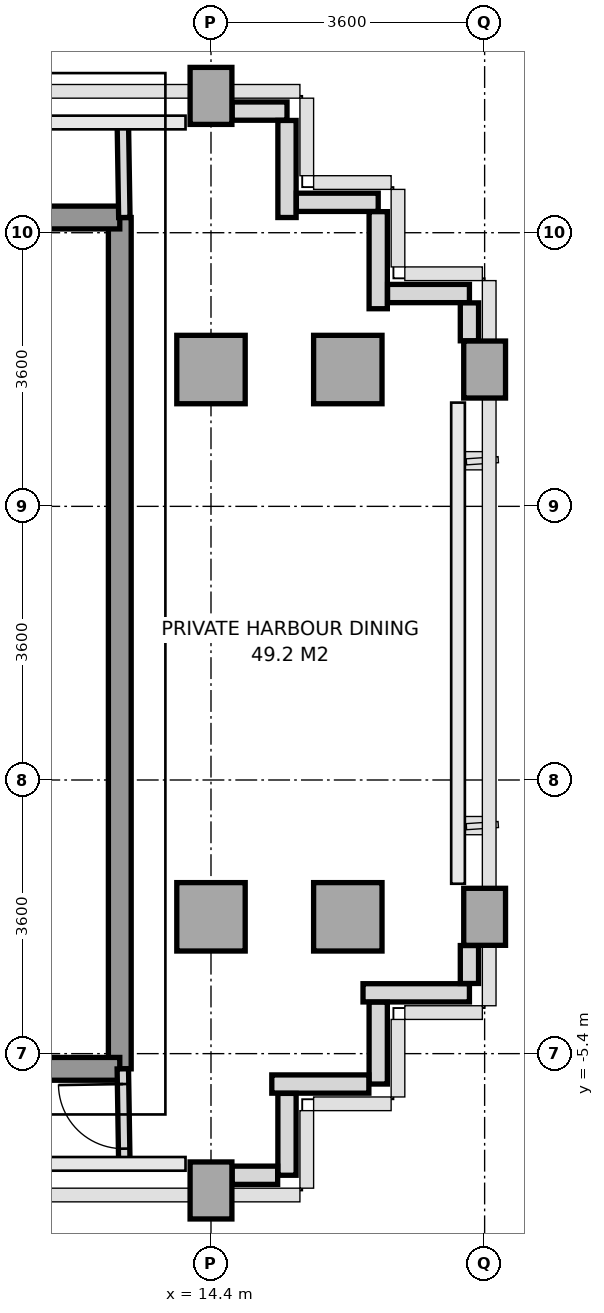
"""IFC4 building model, lengths in metres.
Left out: names, types, materials, properties, quantities, classifications, styles, units other than length and angle.
Written with IfcOpenShell. Run it as: python <this file> out.ifc"""

import sys

from ifc_helpers import new_model, si_unit, direction, frame, frame_2d, origin, origin_2d, place, context, subcontext, project, spatial, rectangle, extrude, source, transform, mapped, element, fill, save


model = new_model("IFC4")
c1 = context("Model", 3, precision=1e-05, world=origin(), true_north=direction((0.0, 1.0)))
c2 = subcontext(c1, "Body", "Model", "MODEL_VIEW")
j1 = project(units=[si_unit("LENGTHUNIT", "METRE"), si_unit("PLANEANGLEUNIT", "RADIAN")], contexts=[c1])
p1 = place(None, origin())
s1 = spatial("IfcSite", under=j1, at=p1, CompositionType="ELEMENT")
p2 = place(p1, origin())
s2 = spatial("IfcBuilding", under=s1, at=p2, CompositionType="ELEMENT")
p3 = place(p2, frame((0.0, 0.0, 246.0)))
s3 = spatial("IfcBuildingStorey", under=s2, at=p3, CompositionType="ELEMENT", Elevation=246.0)
m1 = source(origin(), c2, "Body", "SweptSolid", [
    extrude(rectangle(XDim=0.55, YDim=0.75, at=origin_2d()), origin(), (0.0, 0.0, 1.0), 3.01),
])
p4 = place(p3, frame((14.4, -7.2, 0.0), z_axis=(0.0, 0.0, 1.0), x_axis=(1.0, 0.0, 0.0)))
e1 = element("IfcColumn", 1, at=p4, inside=s3, PredefinedType="COLUMN", context=c2, shape_type="MappedRepresentation", body=[
    mapped(m1, transform((0.0, 0.0, 0.0), x_axis=(1.0, 0.0, 0.0), y_axis=(0.0, 1.0, 0.0), z_axis=(0.0, 0.0, 1.0), scale=1.0)),
])
m2 = source(origin(), c2, "Body", "SweptSolid", [
    extrude(rectangle(XDim=0.9, YDim=0.9, at=origin_2d()), origin(), (0.0, 0.0, 1.0), 3.01),
])
for number, where, z_axis, x_axis in (
    (2, (14.4, -3.6, 0.0), (0.0, 0.0, 1.0), (1.0, 0.0, 0.0)),
    (3, (14.4, 3.6, 0.0), (0.0, 0.0, 1.0), (1.0, 0.0, 0.0)),
):
    element("IfcColumn", number, at=place(p3, frame(where, z_axis=z_axis, x_axis=x_axis)), inside=s3, PredefinedType="COLUMN", context=c2, shape_type="MappedRepresentation", body=[
        mapped(m2, transform((0.0, 0.0, 0.0), x_axis=(1.0, 0.0, 0.0), y_axis=(0.0, 1.0, 0.0), z_axis=(0.0, 0.0, 1.0), scale=1.0)),
    ])
p5 = place(p3, frame((14.4, 7.2, 0.0), z_axis=(0.0, 0.0, 1.0), x_axis=(1.0, 0.0, 0.0)))
e4 = element("IfcColumn", 4, at=p5, inside=s3, PredefinedType="COLUMN", context=c2, shape_type="MappedRepresentation", body=[
    mapped(m1, transform((0.0, 0.0, 0.0), x_axis=(1.0, 0.0, 0.0), y_axis=(0.0, 1.0, 0.0), z_axis=(0.0, 0.0, 1.0), scale=1.0)),
])
for number, where, z_axis, x_axis in (
    (5, (16.2, -3.6, 0.0), (0.0, 0.0, 1.0), (1.0, 0.0, 0.0)),
    (6, (16.2, 3.6, 0.0), (0.0, 0.0, 1.0), (1.0, 0.0, 0.0)),
):
    element("IfcColumn", number, at=place(p3, frame(where, z_axis=z_axis, x_axis=x_axis)), inside=s3, PredefinedType="COLUMN", context=c2, shape_type="MappedRepresentation", body=[
        mapped(m2, transform((0.0, 0.0, 0.0), x_axis=(1.0, 0.0, 0.0), y_axis=(0.0, 1.0, 0.0), z_axis=(0.0, 0.0, 1.0), scale=1.0)),
    ])
for number, where, z_axis, x_axis in (
    (7, (18.0, -3.6, 0.0), (0.0, 0.0, 1.0), (1.0, 0.0, 0.0)),
    (8, (18.0, 3.6, 0.0), (0.0, 0.0, 1.0), (1.0, 0.0, 0.0)),
):
    element("IfcColumn", number, at=place(p3, frame(where, z_axis=z_axis, x_axis=x_axis)), inside=s3, PredefinedType="COLUMN", context=c2, shape_type="MappedRepresentation", body=[
        mapped(m1, transform((0.0, 0.0, 0.0), x_axis=(1.0, 0.0, 0.0), y_axis=(0.0, 1.0, 0.0), z_axis=(0.0, 0.0, 1.0), scale=1.0)),
    ])
p6 = place(p3, frame((17.8, -4.6, 0.0), z_axis=(0.0, 0.0, 1.0), x_axis=(-1.0, 0.0, 0.0)))
e9 = element("IfcWall", 9, at=p6, inside=s3, PredefinedType="PARAPET", context=c2, shape_type="SweptSolid", body=[
    extrude(rectangle(XDim=1.4, YDim=0.24, at=frame_2d((0.7, 0.0))), origin(), (0.0, 0.0, 1.0), 1.15),
])
p7 = place(p3, frame((16.6, -4.723, 0.0), z_axis=(0.0, 0.0, 1.0), x_axis=(0.0, -1.0, 0.0)))
e10 = element("IfcWall", 10, at=p7, inside=s3, PredefinedType="PARAPET", context=c2, shape_type="SweptSolid", body=[
    extrude(rectangle(XDim=1.077, YDim=0.24, at=frame_2d((0.539, 0.0))), origin(), (0.0, 0.0, 1.0), 1.15),
])
p8 = place(p3, frame((16.477, -5.8, 0.0), z_axis=(0.0, 0.0, 1.0), x_axis=(-1.0, 0.0, 0.0)))
e11 = element("IfcWall", 11, at=p8, inside=s3, PredefinedType="PARAPET", context=c2, shape_type="SweptSolid", body=[
    extrude(rectangle(XDim=1.277, YDim=0.24, at=frame_2d((0.639, 0.0))), origin(), (0.0, 0.0, 1.0), 1.15),
])
p9 = place(p3, frame((15.4, -5.923, 0.0), z_axis=(0.0, 0.0, 1.0), x_axis=(0.0, -1.0, 0.0)))
e12 = element("IfcWall", 12, at=p9, inside=s3, PredefinedType="PARAPET", context=c2, shape_type="SweptSolid", body=[
    extrude(rectangle(XDim=1.077, YDim=0.24, at=frame_2d((0.539, 0.0))), origin(), (0.0, 0.0, 1.0), 1.15),
])
p10 = place(p3, frame((15.277, -7.0, 0.0), z_axis=(0.0, 0.0, 1.0), x_axis=(-1.0, 0.0, 0.0)))
e13 = element("IfcWall", 13, at=p10, inside=s3, PredefinedType="PARAPET", context=c2, shape_type="SweptSolid", body=[
    extrude(rectangle(XDim=0.599, YDim=0.24, at=frame_2d((0.3, 0.0))), origin(), (0.0, 0.0, 1.0), 1.15),
])
p11 = place(p3, frame((14.678, 7.0, 0.0), z_axis=(0.0, 0.0, 1.0), x_axis=(1.0, 0.0, 0.0)))
e14 = element("IfcWall", 14, at=p11, inside=s3, PredefinedType="PARAPET", context=c2, shape_type="SweptSolid", body=[
    extrude(rectangle(XDim=0.722, YDim=0.24, at=frame_2d((0.361, 0.0))), origin(), (0.0, 0.0, 1.0), 1.15),
])
p12 = place(p3, frame((15.4, 6.877, 0.0), z_axis=(0.0, 0.0, 1.0), x_axis=(0.0, -1.0, 0.0)))
e15 = element("IfcWall", 15, at=p12, inside=s3, PredefinedType="PARAPET", context=c2, shape_type="SweptSolid", body=[
    extrude(rectangle(XDim=1.277, YDim=0.24, at=frame_2d((0.638, 0.0))), origin(), (0.0, 0.0, 1.0), 1.15),
])
p13 = place(p3, frame((15.523, 5.8, 0.0), z_axis=(0.0, 0.0, 1.0), x_axis=(1.0, 0.0, 0.0)))
e16 = element("IfcWall", 16, at=p13, inside=s3, PredefinedType="PARAPET", context=c2, shape_type="SweptSolid", body=[
    extrude(rectangle(XDim=1.077, YDim=0.24, at=frame_2d((0.539, 0.0))), origin(), (0.0, 0.0, 1.0), 1.15),
])
p14 = place(p3, frame((16.6, 5.677, 0.0), z_axis=(0.0, 0.0, 1.0), x_axis=(0.0, -1.0, 0.0)))
e17 = element("IfcWall", 17, at=p14, inside=s3, PredefinedType="PARAPET", context=c2, shape_type="SweptSolid", body=[
    extrude(rectangle(XDim=1.277, YDim=0.24, at=frame_2d((0.639, 0.0))), origin(), (0.0, 0.0, 1.0), 1.15),
])
p15 = place(p3, frame((16.723, 4.6, 0.0), z_axis=(0.0, 0.0, 1.0), x_axis=(1.0, 0.0, 0.0)))
e18 = element("IfcWall", 18, at=p15, inside=s3, PredefinedType="PARAPET", context=c2, shape_type="SweptSolid", body=[
    extrude(rectangle(XDim=1.077, YDim=0.24, at=frame_2d((0.539, 0.0))), origin(), (0.0, 0.0, 1.0), 1.15),
])
for number, where, z_axis, x_axis in (
    (19, (17.8, 4.477, 0.0), (0.0, 0.0, 1.0), (0.0, -1.0, 0.0)),
    (20, (17.8, -3.978, 0.0), (0.0, 0.0, 1.0), (0.0, -1.0, 0.0)),
):
    element("IfcWall", number, at=place(p3, frame(where, z_axis=z_axis, x_axis=x_axis)), inside=s3, PredefinedType="PARAPET", context=c2, shape_type="SweptSolid", body=[
        extrude(rectangle(XDim=0.499, YDim=0.24, at=frame_2d((0.25, 0.0))), origin(), (0.0, 0.0, 1.0), 1.15),
    ])
p16 = place(p3, frame((13.2, -5.6, 0.0), z_axis=(0.0, 0.0, 1.0), x_axis=(0.0, 1.0, 0.0)))
e21 = element("IfcWall", 21, at=p16, inside=s3, PredefinedType="SHEAR", context=c2, shape_type="SweptSolid", body=[
    extrude(rectangle(XDim=11.2, YDim=0.3, at=frame_2d((5.6, 0.0))), origin(), (0.0, 0.0, 1.0), 3.01),
])
p17 = place(p3, frame((11.356, 5.6, 0.0), z_axis=(0.0, 0.0, 1.0), x_axis=(1.0, 0.0, 0.0)))
e22 = element("IfcWall", 22, at=p17, inside=s3, PredefinedType="SHEAR", context=c2, shape_type="SweptSolid", body=[
    extrude(rectangle(XDim=1.844, YDim=0.3, at=frame_2d((0.922, 0.0))), origin(), (0.0, 0.0, 1.0), 3.01),
])
p18 = place(p3, frame((5.4, -5.6, 0.0), z_axis=(0.0, 0.0, 1.0), x_axis=(1.0, 0.0, 0.0)))
e23 = element("IfcWall", 23, at=p18, inside=s3, PredefinedType="SHEAR", context=c2, shape_type="SweptSolid", body=[
    extrude(rectangle(XDim=7.8, YDim=0.3, at=frame_2d((3.9, 0.0))), origin(), (0.0, 0.0, 1.0), 3.01),
])
p19 = place(p3, frame((13.26, 5.6, 0.0), z_axis=(0.0, 0.0, 1.0), x_axis=(-0.016013571389, 0.999871774545, 0.0)))
e24 = element("IfcWall", 24, at=p19, inside=s3, PredefinedType="PARTITIONING", context=c2, shape_type="SweptSolid", body=[
    extrude(rectangle(XDim=1.25, YDim=0.15, at=frame_2d((0.625, 0.0))), origin(), (0.0, 0.0, 1.0), 3.01),
])
p20 = place(p3, frame((13.26, -6.85, 0.0), z_axis=(0.0, 0.0, 1.0), x_axis=(-0.016013571389, 0.999871774545, 0.0)))
e25 = element("IfcWall", 25, at=p20, inside=s3, PredefinedType="PARTITIONING", context=c2, shape_type="SweptSolid", body=[
    extrude(rectangle(XDim=1.25, YDim=0.15, at=frame_2d((0.625, 0.0))), origin(), (0.0, 0.0, 1.0), 3.01),
])
p21 = place(p20, frame((0.2, 0.0, 0.0)))
e26 = element("IfcOpeningElement", 26, at=p21, cuts=e25, PredefinedType="OPENING", context=c2, shape_type="SweptSolid", body=[
    extrude(rectangle(XDim=0.85, YDim=2.1, at=frame_2d((0.425, 1.05))), frame((0.0, 0.085, 0.0), z_axis=(0.0, -1.0, 0.0), x_axis=(1.0, 0.0, 0.0)), (0.0, 0.0, 1.0), 0.17),
])
m3 = source(origin(), c2, "Body", "SweptSolid", [
    extrude(rectangle(XDim=0.85, YDim=2.1, at=frame_2d((0.425, 1.05))), frame((0.0, 0.025, 0.0), z_axis=(0.0, -1.0, 0.0), x_axis=(1.0, 0.0, 0.0)), (0.0, 0.0, 1.0), 0.05),
])
p22 = place(p21, origin())
e27 = element("IfcDoor", 27, at=p22, inside=s3, OperationType="SINGLE_SWING_RIGHT", PredefinedType="DOOR", context=c2, shape_type="MappedRepresentation", body=[
    mapped(m3, transform((0.0, 0.0, 0.0), x_axis=(1.0, 0.0, 0.0), y_axis=(0.0, 1.0, 0.0), z_axis=(0.0, 0.0, 1.0), scale=1.0)),
])
fill(e26, e27)
save(model, sys.argv[1])
